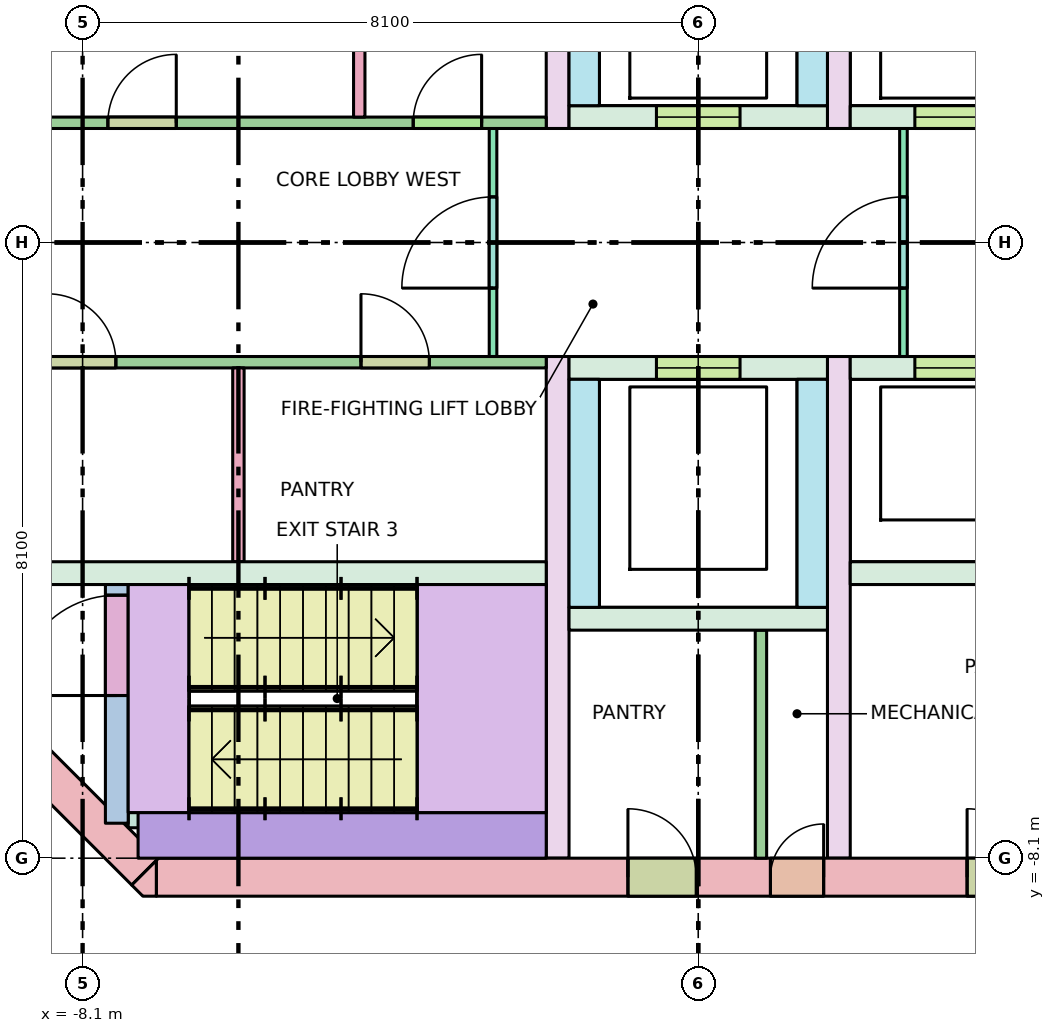
"""IFC4 building model, lengths in metres.
Left out: names, types, materials, properties, quantities, classifications, styles, units other than length and angle.
Written with IfcOpenShell. Run it as: python <this file> out.ifc"""

import sys

from ifc_helpers import new_model, si_unit, direction, frame, frame_2d, origin, place, context, subcontext, project, spatial, polyline, rectangle, outline, extrude, element, fill, save


model = new_model("IFC4")
c1 = context("Model", 3, precision=1e-05, world=origin(), true_north=direction((0.0, 1.0)))
c2 = subcontext(c1, "Body", "Model", "MODEL_VIEW")
j1 = project(units=[si_unit("LENGTHUNIT", "METRE"), si_unit("PLANEANGLEUNIT", "RADIAN")], contexts=[c1])
p1 = place(None, origin())
s1 = spatial("IfcSite", under=j1, at=p1, CompositionType="ELEMENT")
p2 = place(p1, origin())
s2 = spatial("IfcBuilding", under=s1, at=p2, CompositionType="ELEMENT")
p3 = place(p2, frame((0.0, 0.0, 276.0)))
s3 = spatial("IfcBuildingStorey", under=s2, at=p3, CompositionType="ELEMENT", Elevation=276.0)
p4 = place(p3, frame((-7.13, -8.35, -0.28), z_axis=(0.0, 0.0, 1.0), x_axis=(1.0, 0.0, 0.0)))
e1 = element("IfcWall", 1, at=p4, inside=s3, PredefinedType="SHEAR", context=c2, shape_type="SweptSolid", body=[
    extrude(rectangle(XDim=14.26, YDim=0.5, at=frame_2d((7.13, 0.0))), origin(), (0.0, 0.0, 1.0), 7.4),
])
p5 = place(p4, frame((8.08, 0.0, 0.28)))
e2 = element("IfcOpeningElement", 2, at=p5, cuts=e1, PredefinedType="OPENING", context=c2, shape_type="SweptSolid", body=[
    extrude(rectangle(XDim=0.7, YDim=2.1, at=frame_2d((0.35, 1.05))), frame((0.0, 0.26, 0.0), z_axis=(0.0, -1.0, 0.0), x_axis=(1.0, 0.0, 0.0)), (0.0, 0.0, 1.0), 0.52),
])
p6 = place(p4, frame((6.205, 0.0, 0.28)))
e3 = element("IfcOpeningElement", 3, at=p6, cuts=e1, PredefinedType="OPENING", context=c2, shape_type="SweptSolid", body=[
    extrude(rectangle(XDim=0.9, YDim=2.1, at=frame_2d((0.45, 1.05))), frame((0.0, 0.26, 0.0), z_axis=(0.0, -1.0, 0.0), x_axis=(1.0, 0.0, 0.0)), (0.0, 0.0, 1.0), 0.52),
])
p7 = place(p4, frame((10.667, 0.0, 0.28)))
e4 = element("IfcOpeningElement", 4, at=p7, cuts=e1, PredefinedType="OPENING", context=c2, shape_type="SweptSolid", body=[
    extrude(rectangle(XDim=0.9, YDim=2.1, at=frame_2d((0.45, 1.05))), frame((0.0, 0.26, 0.0), z_axis=(0.0, -1.0, 0.0), x_axis=(1.0, 0.0, 0.0)), (0.0, 0.0, 1.0), 0.52),
])
p8 = place(p3, frame((-7.277, -8.277, -0.28), z_axis=(0.0, 0.0, 1.0), x_axis=(-0.707106781187, 0.707106781187, 0.0)))
e5 = element("IfcWall", 5, at=p8, inside=s3, PredefinedType="SHEAR", context=c2, shape_type="SweptSolid", body=[
    extrude(rectangle(XDim=4.243, YDim=0.5, at=frame_2d((2.121, 0.0))), origin(), (0.0, 0.0, 1.0), 7.4),
])
p9 = place(p8, frame((2.393, 0.0, 0.28)))
e6 = element("IfcOpeningElement", 6, at=p9, cuts=e5, PredefinedType="OPENING", context=c2, shape_type="SweptSolid", body=[
    extrude(rectangle(XDim=1.2, YDim=2.1, at=frame_2d((0.6, 1.05))), frame((0.0, 0.26, 0.0), z_axis=(0.0, -1.0, 0.0), x_axis=(1.0, 0.0, 0.0)), (0.0, 0.0, 1.0), 0.52),
])
p10 = place(p3, frame((0.0, 0.0, -0.28)))
e7 = element("IfcWall", 7, at=p10, inside=s3, PredefinedType="SHEAR", context=c2, shape_type="SweptSolid", body=[
    extrude(outline(polyline([(-7.307, -8.6), (-7.454, -8.454), (-7.13, -8.13), (-7.13, -8.6), (-7.307, -8.6)])), origin(), (0.0, 0.0, 1.0), 7.4),
])
for number, where, z_axis, x_axis in (
    (8, (-10.1, -4.35, 0.0), (0.0, 0.0, 1.0), (1.0, 0.0, 0.0)),
    (9, (2.0, -4.35, 0.0), (0.0, 0.0, 1.0), (1.0, 0.0, 0.0)),
):
    element("IfcWall", number, at=place(p3, frame(where, z_axis=z_axis, x_axis=x_axis)), inside=s3, PredefinedType="SOLIDWALL", context=c2, shape_type="SweptSolid", body=[
        extrude(rectangle(XDim=8.1, YDim=0.3, at=frame_2d((4.05, 0.0))), origin(), (0.0, 0.0, 1.0), 7.12),
    ])
p11 = place(p3, frame((2.0, 1.65, 0.0), z_axis=(0.0, 0.0, 1.0), x_axis=(1.0, 0.0, 0.0)))
e10 = element("IfcWall", 10, at=p11, inside=s3, PredefinedType="SOLIDWALL", context=c2, shape_type="SweptSolid", body=[
    extrude(rectangle(XDim=8.1, YDim=0.3, at=frame_2d((4.05, 0.0))), origin(), (0.0, 0.0, 1.0), 7.12),
])
p12 = place(p11, frame((0.85, 0.0, 0.0)))
e11 = element("IfcOpeningElement", 11, at=p12, cuts=e10, PredefinedType="OPENING", context=c2, shape_type="SweptSolid", body=[
    extrude(rectangle(XDim=1.1, YDim=2.1, at=frame_2d((0.55, 1.05))), frame((0.0, 0.16, 0.0), z_axis=(0.0, -1.0, 0.0), x_axis=(1.0, 0.0, 0.0)), (0.0, 0.0, 1.0), 0.32),
])
p13 = place(p11, frame((3.5, 0.0, 0.0)))
e12 = element("IfcOpeningElement", 12, at=p13, cuts=e10, PredefinedType="OPENING", context=c2, shape_type="SweptSolid", body=[
    extrude(rectangle(XDim=1.1, YDim=2.1, at=frame_2d((0.55, 1.05))), frame((0.0, 0.16, 0.0), z_axis=(0.0, -1.0, 0.0), x_axis=(1.0, 0.0, 0.0)), (0.0, 0.0, 1.0), 0.32),
])
p14 = place(p11, frame((6.3, 0.0, 0.0)))
e13 = element("IfcOpeningElement", 13, at=p14, cuts=e10, PredefinedType="OPENING", context=c2, shape_type="SweptSolid", body=[
    extrude(rectangle(XDim=1.1, YDim=2.1, at=frame_2d((0.55, 1.05))), frame((0.0, 0.16, 0.0), z_axis=(0.0, -1.0, 0.0), x_axis=(1.0, 0.0, 0.0)), (0.0, 0.0, 1.0), 0.32),
])
p15 = place(p3, frame((2.0, -1.65, 0.0), z_axis=(0.0, 0.0, 1.0), x_axis=(1.0, 0.0, 0.0)))
e14 = element("IfcWall", 14, at=p15, inside=s3, PredefinedType="SOLIDWALL", context=c2, shape_type="SweptSolid", body=[
    extrude(rectangle(XDim=8.1, YDim=0.3, at=frame_2d((4.05, 0.0))), origin(), (0.0, 0.0, 1.0), 7.12),
])
p16 = place(p15, frame((0.85, 0.0, 0.0)))
e15 = element("IfcOpeningElement", 15, at=p16, cuts=e14, PredefinedType="OPENING", context=c2, shape_type="SweptSolid", body=[
    extrude(rectangle(XDim=1.1, YDim=2.1, at=frame_2d((0.55, 1.05))), frame((0.0, 0.16, 0.0), z_axis=(0.0, -1.0, 0.0), x_axis=(1.0, 0.0, 0.0)), (0.0, 0.0, 1.0), 0.32),
])
p17 = place(p15, frame((3.5, 0.0, 0.0)))
e16 = element("IfcOpeningElement", 16, at=p17, cuts=e14, PredefinedType="OPENING", context=c2, shape_type="SweptSolid", body=[
    extrude(rectangle(XDim=1.1, YDim=2.1, at=frame_2d((0.55, 1.05))), frame((0.0, 0.16, 0.0), z_axis=(0.0, -1.0, 0.0), x_axis=(1.0, 0.0, 0.0)), (0.0, 0.0, 1.0), 0.32),
])
p18 = place(p15, frame((6.3, 0.0, 0.0)))
e17 = element("IfcOpeningElement", 17, at=p18, cuts=e14, PredefinedType="OPENING", context=c2, shape_type="SweptSolid", body=[
    extrude(rectangle(XDim=1.1, YDim=2.1, at=frame_2d((0.55, 1.05))), frame((0.0, 0.16, 0.0), z_axis=(0.0, -1.0, 0.0), x_axis=(1.0, 0.0, 0.0)), (0.0, 0.0, 1.0), 0.32),
])
for number, where, z_axis, x_axis in (
    (18, (-1.85, 1.5, 0.0), (0.0, 0.0, 1.0), (0.0, 1.0, 0.0)),
    (19, (-1.85, -8.1, 0.0), (0.0, 0.0, 1.0), (0.0, 1.0, 0.0)),
    (20, (1.85, 1.5, 0.0), (0.0, 0.0, 1.0), (0.0, 1.0, 0.0)),
    (21, (1.85, -8.1, 0.0), (0.0, 0.0, 1.0), (0.0, 1.0, 0.0)),
):
    element("IfcWall", number, at=place(p3, frame(where, z_axis=z_axis, x_axis=x_axis)), inside=s3, PredefinedType="SHEAR", context=c2, shape_type="SweptSolid", body=[
        extrude(rectangle(XDim=6.6, YDim=0.3, at=frame_2d((3.3, 0.0))), origin(), (0.0, 0.0, 1.0), 7.12),
    ])
p19 = place(p3, frame((-1.7, 1.65, 0.0), z_axis=(0.0, 0.0, 1.0), x_axis=(1.0, 0.0, 0.0)))
e22 = element("IfcWall", 22, at=p19, inside=s3, PredefinedType="SOLIDWALL", context=c2, shape_type="SweptSolid", body=[
    extrude(rectangle(XDim=3.4, YDim=0.3, at=frame_2d((1.7, 0.0))), origin(), (0.0, 0.0, 1.0), 7.12),
])
p20 = place(p19, frame((1.15, 0.0, 0.0)))
e23 = element("IfcOpeningElement", 23, at=p20, cuts=e22, PredefinedType="OPENING", context=c2, shape_type="SweptSolid", body=[
    extrude(rectangle(XDim=1.1, YDim=2.1, at=frame_2d((0.55, 1.05))), frame((0.0, 0.16, 0.0), z_axis=(0.0, -1.0, 0.0), x_axis=(1.0, 0.0, 0.0)), (0.0, 0.0, 1.0), 0.32),
])
p21 = place(p3, frame((-1.7, -1.65, 0.0), z_axis=(0.0, 0.0, 1.0), x_axis=(1.0, 0.0, 0.0)))
e24 = element("IfcWall", 24, at=p21, inside=s3, PredefinedType="SOLIDWALL", context=c2, shape_type="SweptSolid", body=[
    extrude(rectangle(XDim=3.4, YDim=0.3, at=frame_2d((1.7, 0.0))), origin(), (0.0, 0.0, 1.0), 7.12),
])
p22 = place(p21, frame((1.15, 0.0, 0.0)))
e25 = element("IfcOpeningElement", 25, at=p22, cuts=e24, PredefinedType="OPENING", context=c2, shape_type="SweptSolid", body=[
    extrude(rectangle(XDim=1.1, YDim=2.1, at=frame_2d((0.55, 1.05))), frame((0.0, 0.16, 0.0), z_axis=(0.0, -1.0, 0.0), x_axis=(1.0, 0.0, 0.0)), (0.0, 0.0, 1.0), 0.32),
])
for number, where, z_axis, x_axis in (
    (26, (-1.5, 1.8, 0.0), (0.0, 0.0, 1.0), (0.0, 1.0, 0.0)),
    (27, (-1.5, -4.8, 0.0), (0.0, 0.0, 1.0), (0.0, 1.0, 0.0)),
    (28, (1.5, 1.8, 0.0), (0.0, 0.0, 1.0), (0.0, 1.0, 0.0)),
    (29, (1.5, -4.8, 0.0), (0.0, 0.0, 1.0), (0.0, 1.0, 0.0)),
):
    element("IfcWall", number, at=place(p3, frame(where, z_axis=z_axis, x_axis=x_axis)), inside=s3, PredefinedType="SOLIDWALL", context=c2, shape_type="SweptSolid", body=[
        extrude(rectangle(XDim=3.0, YDim=0.4, at=frame_2d((1.5, 0.0))), origin(), (0.0, 0.0, 1.0), 7.12),
    ])
p23 = place(p3, frame((-1.7, -4.95, 0.0), z_axis=(0.0, 0.0, 1.0), x_axis=(1.0, 0.0, 0.0)))
e30 = element("IfcWall", 30, at=p23, inside=s3, PredefinedType="SOLIDWALL", context=c2, shape_type="SweptSolid", body=[
    extrude(rectangle(XDim=3.4, YDim=0.3, at=frame_2d((1.7, 0.0))), origin(), (0.0, 0.0, 1.0), 7.12),
])
p24 = place(p3, frame((-7.65, -7.64, 0.0), z_axis=(0.0, 0.0, 1.0), x_axis=(0.0, 1.0, 0.0)))
e31 = element("IfcWall", 31, at=p24, inside=s3, PredefinedType="SHEAR", context=c2, shape_type="SweptSolid", body=[
    extrude(rectangle(XDim=3.14, YDim=0.3, at=frame_2d((1.57, 0.0))), origin(), (0.0, 0.0, 1.0), 7.12),
])
p25 = place(p24, frame((1.68, 0.0, 0.0)))
e32 = element("IfcOpeningElement", 32, at=p25, cuts=e31, PredefinedType="OPENING", context=c2, shape_type="SweptSolid", body=[
    extrude(rectangle(XDim=1.32, YDim=2.1, at=frame_2d((0.66, 1.05))), frame((0.0, 0.16, 0.0), z_axis=(0.0, -1.0, 0.0), x_axis=(1.0, 0.0, 0.0)), (0.0, 0.0, 1.0), 0.32),
])
p26 = place(p3, frame((-7.5, -7.6, 0.0), z_axis=(0.0, 0.0, 1.0), x_axis=(1.0, 0.0, 0.0)))
e33 = element("IfcWall", 33, at=p26, inside=s3, PredefinedType="SHEAR", context=c2, shape_type="SweptSolid", body=[
    extrude(rectangle(XDim=0.6, YDim=0.2, at=frame_2d((0.3, 0.0))), origin(), (0.0, 0.0, 1.0), 7.12),
])
p27 = place(p3, frame((-7.37, -7.8, 0.0), z_axis=(0.0, 0.0, 1.0), x_axis=(1.0, 0.0, 0.0)))
e34 = element("IfcWall", 34, at=p27, inside=s3, PredefinedType="SHEAR", context=c2, shape_type="SweptSolid", body=[
    extrude(rectangle(XDim=5.37, YDim=0.6, at=frame_2d((2.685, 0.0))), origin(), (0.0, 0.0, 1.0), 7.12),
])
p28 = place(p3, frame((-2.7, -1.5, 0.0), z_axis=(0.0, 0.0, 1.0), x_axis=(0.0, 1.0, 0.0)))
e35 = element("IfcWall", 35, at=p28, inside=s3, PredefinedType="PARTITIONING", context=c2, shape_type="SweptSolid", body=[
    extrude(rectangle(XDim=3.0, YDim=0.1, at=frame_2d((1.5, 0.0))), origin(), (0.0, 0.0, 1.0), 7.12),
])
p29 = place(p28, frame((0.9, 0.0, 0.0)))
e36 = element("IfcOpeningElement", 36, at=p29, cuts=e35, PredefinedType="OPENING", context=c2, shape_type="SweptSolid", body=[
    extrude(rectangle(XDim=1.2, YDim=2.1, at=frame_2d((0.6, 1.05))), frame((0.0, 0.06, 0.0), z_axis=(0.0, -1.0, 0.0), x_axis=(1.0, 0.0, 0.0)), (0.0, 0.0, 1.0), 0.12),
])
p30 = place(p3, frame((2.7, -1.5, 0.0), z_axis=(0.0, 0.0, 1.0), x_axis=(0.0, 1.0, 0.0)))
e37 = element("IfcWall", 37, at=p30, inside=s3, PredefinedType="PARTITIONING", context=c2, shape_type="SweptSolid", body=[
    extrude(rectangle(XDim=3.0, YDim=0.1, at=frame_2d((1.5, 0.0))), origin(), (0.0, 0.0, 1.0), 7.12),
])
p31 = place(p30, frame((0.9, 0.0, 0.0)))
e38 = element("IfcOpeningElement", 38, at=p31, cuts=e37, PredefinedType="OPENING", context=c2, shape_type="SweptSolid", body=[
    extrude(rectangle(XDim=1.2, YDim=2.1, at=frame_2d((0.6, 1.05))), frame((0.0, 0.06, 0.0), z_axis=(0.0, -1.0, 0.0), x_axis=(1.0, 0.0, 0.0)), (0.0, 0.0, 1.0), 0.12),
])
p32 = place(p3, frame((0.825, -8.1, 0.0), z_axis=(0.0, 0.0, 1.0), x_axis=(0.0, 1.0, 0.0)))
e39 = element("IfcWall", 39, at=p32, inside=s3, PredefinedType="PARTITIONING", context=c2, shape_type="SweptSolid", body=[
    extrude(rectangle(XDim=3.0, YDim=0.15, at=frame_2d((1.5, 0.0))), origin(), (0.0, 0.0, 1.0), 7.12),
])
for number, where, z_axis, x_axis in (
    (40, (-4.46, 1.65, 0.0), (0.0, 0.0, 1.0), (0.0, 1.0, 0.0)),
    (41, (-6.05, -4.2, 0.0), (0.0, 0.0, 1.0), (0.0, 1.0, 0.0)),
):
    element("IfcWall", number, at=place(p3, frame(where, z_axis=z_axis, x_axis=x_axis)), inside=s3, PredefinedType="PARTITIONING", context=c2, shape_type="SweptSolid", body=[
        extrude(rectangle(XDim=2.55, YDim=0.15, at=frame_2d((1.275, 0.0))), origin(), (0.0, 0.0, 1.0), 7.12),
    ])
p33 = place(p3, frame((-10.1, 1.575, 0.0), z_axis=(0.0, 0.0, 1.0), x_axis=(1.0, 0.0, 0.0)))
e42 = element("IfcWall", 42, at=p33, inside=s3, PredefinedType="PARTITIONING", context=c2, shape_type="SweptSolid", body=[
    extrude(rectangle(XDim=8.1, YDim=0.15, at=frame_2d((4.05, 0.0))), origin(), (0.0, 0.0, 1.0), 7.12),
])
p34 = place(p33, frame((2.333, 0.0, 0.0)))
e43 = element("IfcOpeningElement", 43, at=p34, cuts=e42, PredefinedType="OPENING", context=c2, shape_type="SweptSolid", body=[
    extrude(rectangle(XDim=0.9, YDim=2.1, at=frame_2d((0.45, 1.05))), frame((0.0, 0.085, 0.0), z_axis=(0.0, -1.0, 0.0), x_axis=(1.0, 0.0, 0.0)), (0.0, 0.0, 1.0), 0.17),
])
p35 = place(p33, frame((6.35, 0.0, 0.0)))
e44 = element("IfcOpeningElement", 44, at=p35, cuts=e42, PredefinedType="OPENING", context=c2, shape_type="SweptSolid", body=[
    extrude(rectangle(XDim=0.9, YDim=2.1, at=frame_2d((0.45, 1.05))), frame((0.0, 0.085, 0.0), z_axis=(0.0, -1.0, 0.0), x_axis=(1.0, 0.0, 0.0)), (0.0, 0.0, 1.0), 0.17),
])
p36 = place(p3, frame((-10.1, -1.575, 0.0), z_axis=(0.0, 0.0, 1.0), x_axis=(1.0, 0.0, 0.0)))
e45 = element("IfcWall", 45, at=p36, inside=s3, PredefinedType="PARTITIONING", context=c2, shape_type="SweptSolid", body=[
    extrude(rectangle(XDim=8.1, YDim=0.15, at=frame_2d((4.05, 0.0))), origin(), (0.0, 0.0, 1.0), 7.12),
])
p37 = place(p36, frame((1.538, 0.0, 0.0)))
e46 = element("IfcOpeningElement", 46, at=p37, cuts=e45, PredefinedType="OPENING", context=c2, shape_type="SweptSolid", body=[
    extrude(rectangle(XDim=0.9, YDim=2.1, at=frame_2d((0.45, 1.05))), frame((0.0, 0.085, 0.0), z_axis=(0.0, -1.0, 0.0), x_axis=(1.0, 0.0, 0.0)), (0.0, 0.0, 1.0), 0.17),
])
p38 = place(p36, frame((5.663, 0.0, 0.0)))
e47 = element("IfcOpeningElement", 47, at=p38, cuts=e45, PredefinedType="OPENING", context=c2, shape_type="SweptSolid", body=[
    extrude(rectangle(XDim=0.9, YDim=2.1, at=frame_2d((0.45, 1.05))), frame((0.0, 0.085, 0.0), z_axis=(0.0, -1.0, 0.0), x_axis=(1.0, 0.0, 0.0)), (0.0, 0.0, 1.0), 0.17),
])
p39 = place(p3, frame((-8.369, -11.038, 0.0), z_axis=(0.0, 0.0, 1.0), x_axis=(-0.707106781187, 0.707106781187, 0.0)))
e48 = element("IfcWall", 48, at=p39, inside=s3, PredefinedType="PARTITIONING", context=c2, shape_type="SweptSolid", body=[
    extrude(rectangle(XDim=6.602, YDim=0.15, at=frame_2d((3.301, 0.0))), origin(), (0.0, 0.0, 1.0), 6.27),
])
p40 = place(p39, frame((2.401, 0.0, 0.0)))
e49 = element("IfcOpeningElement", 49, at=p40, cuts=e48, PredefinedType="OPENING", context=c2, shape_type="SweptSolid", body=[
    extrude(rectangle(XDim=1.8, YDim=2.1, at=frame_2d((0.9, 1.05))), frame((0.0, 0.085, 0.0), z_axis=(0.0, -1.0, 0.0), x_axis=(1.0, 0.0, 0.0)), (0.0, 0.0, 1.0), 0.17),
])
p41 = place(p12, origin())
e50 = element("IfcDoor", 50, at=p41, inside=s3, OperationType="DOUBLE_DOOR_SLIDING", PredefinedType="DOOR", context=c2, shape_type="SweptSolid", body=[
    extrude(rectangle(XDim=1.1, YDim=2.1, at=frame_2d((0.55, 1.05))), frame((0.0, 0.025, 0.0), z_axis=(0.0, -1.0, 0.0), x_axis=(1.0, 0.0, 0.0)), (0.0, 0.0, 1.0), 0.05),
])
fill(e11, e50)
p42 = place(p16, origin())
e51 = element("IfcDoor", 51, at=p42, inside=s3, OperationType="DOUBLE_DOOR_SLIDING", PredefinedType="DOOR", context=c2, shape_type="SweptSolid", body=[
    extrude(rectangle(XDim=1.1, YDim=2.1, at=frame_2d((0.55, 1.05))), frame((0.0, 0.025, 0.0), z_axis=(0.0, -1.0, 0.0), x_axis=(1.0, 0.0, 0.0)), (0.0, 0.0, 1.0), 0.05),
])
fill(e15, e51)
p43 = place(p20, origin())
e52 = element("IfcDoor", 52, at=p43, inside=s3, OperationType="DOUBLE_DOOR_SLIDING", PredefinedType="DOOR", context=c2, shape_type="SweptSolid", body=[
    extrude(rectangle(XDim=1.1, YDim=2.1, at=frame_2d((0.55, 1.05))), frame((0.0, 0.025, 0.0), z_axis=(0.0, -1.0, 0.0), x_axis=(1.0, 0.0, 0.0)), (0.0, 0.0, 1.0), 0.05),
])
fill(e23, e52)
p44 = place(p22, origin())
e53 = element("IfcDoor", 53, at=p44, inside=s3, OperationType="DOUBLE_DOOR_SLIDING", PredefinedType="DOOR", context=c2, shape_type="SweptSolid", body=[
    extrude(rectangle(XDim=1.1, YDim=2.1, at=frame_2d((0.55, 1.05))), frame((0.0, 0.025, 0.0), z_axis=(0.0, -1.0, 0.0), x_axis=(1.0, 0.0, 0.0)), (0.0, 0.0, 1.0), 0.05),
])
fill(e25, e53)
p45 = place(p25, origin())
e54 = element("IfcDoor", 54, at=p45, inside=s3, OperationType="DOUBLE_DOOR_SINGLE_SWING", PredefinedType="DOOR", context=c2, shape_type="SweptSolid", body=[
    extrude(rectangle(XDim=1.32, YDim=2.1, at=frame_2d((0.66, 1.05))), frame((0.0, 0.025, 0.0), z_axis=(0.0, -1.0, 0.0), x_axis=(1.0, 0.0, 0.0)), (0.0, 0.0, 1.0), 0.05),
])
fill(e32, e54)
p46 = place(p29, origin())
e55 = element("IfcDoor", 55, at=p46, inside=s3, OperationType="SINGLE_SWING_LEFT", PredefinedType="DOOR", context=c2, shape_type="SweptSolid", body=[
    extrude(rectangle(XDim=1.2, YDim=2.1, at=frame_2d((0.6, 1.05))), frame((0.0, 0.025, 0.0), z_axis=(0.0, -1.0, 0.0), x_axis=(1.0, 0.0, 0.0)), (0.0, 0.0, 1.0), 0.05),
])
fill(e36, e55)
p47 = place(p31, origin())
e56 = element("IfcDoor", 56, at=p47, inside=s3, OperationType="SINGLE_SWING_LEFT", PredefinedType="DOOR", context=c2, shape_type="SweptSolid", body=[
    extrude(rectangle(XDim=1.2, YDim=2.1, at=frame_2d((0.6, 1.05))), frame((0.0, 0.025, 0.0), z_axis=(0.0, -1.0, 0.0), x_axis=(1.0, 0.0, 0.0)), (0.0, 0.0, 1.0), 0.05),
])
fill(e38, e56)
p48 = place(p5, origin())
e57 = element("IfcDoor", 57, at=p48, inside=s3, OperationType="SINGLE_SWING_RIGHT", PredefinedType="DOOR", context=c2, shape_type="SweptSolid", body=[
    extrude(rectangle(XDim=0.7, YDim=2.1, at=frame_2d((0.35, 1.05))), frame((0.0, 0.025, 0.0), z_axis=(0.0, -1.0, 0.0), x_axis=(1.0, 0.0, 0.0)), (0.0, 0.0, 1.0), 0.05),
])
fill(e2, e57)
p49 = place(p6, origin())
e58 = element("IfcDoor", 58, at=p49, inside=s3, OperationType="SINGLE_SWING_LEFT", PredefinedType="DOOR", context=c2, shape_type="SweptSolid", body=[
    extrude(rectangle(XDim=0.9, YDim=2.1, at=frame_2d((0.45, 1.05))), frame((0.0, 0.025, 0.0), z_axis=(0.0, -1.0, 0.0), x_axis=(1.0, 0.0, 0.0)), (0.0, 0.0, 1.0), 0.05),
])
fill(e3, e58)
p50 = place(p7, origin())
e59 = element("IfcDoor", 59, at=p50, inside=s3, OperationType="SINGLE_SWING_LEFT", PredefinedType="DOOR", context=c2, shape_type="SweptSolid", body=[
    extrude(rectangle(XDim=0.9, YDim=2.1, at=frame_2d((0.45, 1.05))), frame((0.0, 0.025, 0.0), z_axis=(0.0, -1.0, 0.0), x_axis=(1.0, 0.0, 0.0)), (0.0, 0.0, 1.0), 0.05),
])
fill(e4, e59)
p51 = place(p34, origin())
e60 = element("IfcDoor", 60, at=p51, inside=s3, OperationType="SINGLE_SWING_RIGHT", PredefinedType="DOOR", context=c2, shape_type="SweptSolid", body=[
    extrude(rectangle(XDim=0.9, YDim=2.1, at=frame_2d((0.45, 1.05))), frame((0.0, 0.025, 0.0), z_axis=(0.0, -1.0, 0.0), x_axis=(1.0, 0.0, 0.0)), (0.0, 0.0, 1.0), 0.05),
])
fill(e43, e60)
p52 = place(p35, origin())
e61 = element("IfcDoor", 61, at=p52, inside=s3, OperationType="SINGLE_SWING_RIGHT", PredefinedType="DOOR", context=c2, shape_type="SweptSolid", body=[
    extrude(rectangle(XDim=0.9, YDim=2.1, at=frame_2d((0.45, 1.05))), frame((0.0, 0.025, 0.0), z_axis=(0.0, -1.0, 0.0), x_axis=(1.0, 0.0, 0.0)), (0.0, 0.0, 1.0), 0.05),
])
fill(e44, e61)
p53 = place(p37, origin())
e62 = element("IfcDoor", 62, at=p53, inside=s3, OperationType="SINGLE_SWING_LEFT", PredefinedType="DOOR", context=c2, shape_type="SweptSolid", body=[
    extrude(rectangle(XDim=0.9, YDim=2.1, at=frame_2d((0.45, 1.05))), frame((0.0, 0.025, 0.0), z_axis=(0.0, -1.0, 0.0), x_axis=(1.0, 0.0, 0.0)), (0.0, 0.0, 1.0), 0.05),
])
fill(e46, e62)
p54 = place(p38, origin())
e63 = element("IfcDoor", 63, at=p54, inside=s3, OperationType="SINGLE_SWING_LEFT", PredefinedType="DOOR", context=c2, shape_type="SweptSolid", body=[
    extrude(rectangle(XDim=0.9, YDim=2.1, at=frame_2d((0.45, 1.05))), frame((0.0, 0.025, 0.0), z_axis=(0.0, -1.0, 0.0), x_axis=(1.0, 0.0, 0.0)), (0.0, 0.0, 1.0), 0.05),
])
fill(e47, e63)
save(model, sys.argv[1])
